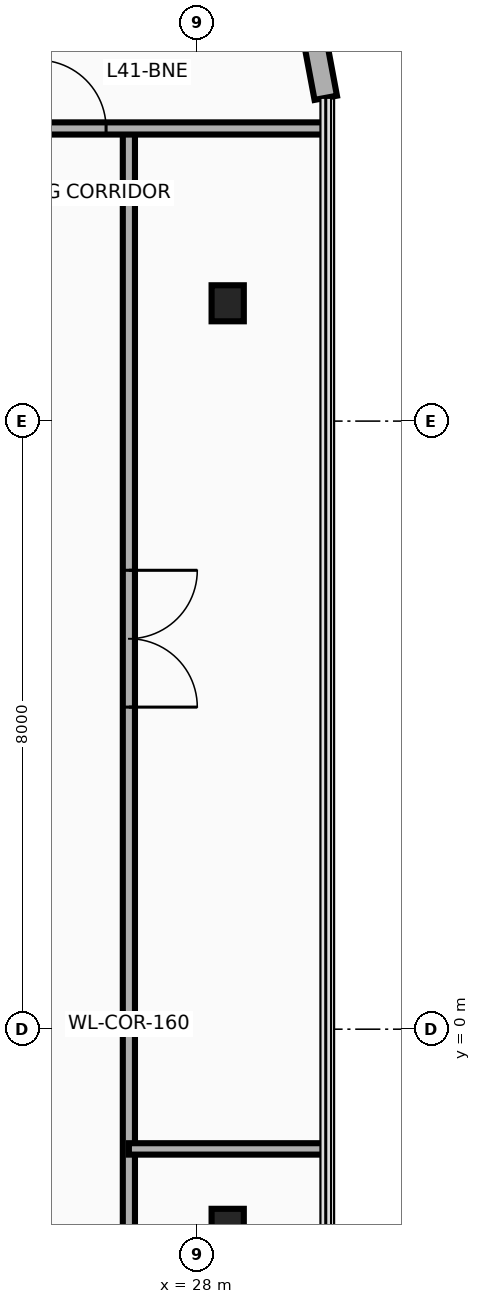
"""IFC4 building model, lengths in metres.
Left out: names, types, materials, properties, quantities, classifications, styles, units other than length and angle.
Written with IfcOpenShell. Run it as: python <this file> out.ifc"""

import sys

from ifc_helpers import new_model, si_unit, direction, frame, frame_2d, origin, origin_2d, place, context, subcontext, project, spatial, rectangle, i_section, extrude, source, transform, mapped, element, fill, save


model = new_model("IFC4")
c1 = context("Model", 3, precision=1e-05, world=origin(), true_north=direction((0.0, 1.0)))
c2 = subcontext(c1, "Body", "Model", "MODEL_VIEW")
j1 = project(units=[si_unit("LENGTHUNIT", "METRE"), si_unit("PLANEANGLEUNIT", "RADIAN")], contexts=[c1])
p1 = place(None, origin())
s1 = spatial("IfcSite", under=j1, at=p1, CompositionType="ELEMENT")
p2 = place(p1, origin())
s2 = spatial("IfcBuilding", under=s1, at=p2, CompositionType="ELEMENT")
p3 = place(p2, frame((0.0, 0.0, 161.2)))
s3 = spatial("IfcBuildingStorey", under=s2, at=p3, CompositionType="ELEMENT", Elevation=161.2)
m1 = source(origin(), c2, "Body", "SweptSolid", [
    extrude(i_section(OverallWidth=0.424, OverallDepth=0.474, WebThickness=0.048, FlangeThickness=0.077, at=origin_2d()), origin(), (0.0, 0.0, 1.0), 3.7),
])
for number, where, z_axis, x_axis in (
    (1, (28.4, -2.6, 0.0), (0.0, 0.0, 1.0), (1.0, 0.0, 0.0)),
    (2, (28.4, 9.55, 0.0), (0.0, 0.0, 1.0), (1.0, 0.0, 0.0)),
):
    element("IfcColumn", number, at=place(p3, frame(where, z_axis=z_axis, x_axis=x_axis)), inside=s3, PredefinedType="COLUMN", context=c2, shape_type="MappedRepresentation", body=[
        mapped(m1, transform((0.0, 0.0, 0.0), x_axis=(1.0, 0.0, 0.0), y_axis=(0.0, 1.0, 0.0), z_axis=(0.0, 0.0, 1.0), scale=1.0)),
    ])
p4 = place(p3, frame((29.493, 13.307, 0.0), z_axis=(0.0, 0.0, 1.0), x_axis=(0.183752343116, -0.98297257154, 0.0)))
e3 = element("IfcWall", 3, at=p4, inside=s3, PredefinedType="SOLIDWALL", context=c2, shape_type="SweptSolid", body=[
    extrude(rectangle(XDim=1.072, YDim=0.3, at=frame_2d((0.536, 0.0))), origin(), (0.0, 0.0, 1.0), 3.46),
])
p5 = place(p3, frame((27.1, -11.701, 0.0), z_axis=(0.0, 0.0, 1.0), x_axis=(0.0, 1.0, 0.0)))
e4 = element("IfcWall", 4, at=p5, inside=s3, PredefinedType="PARTITIONING", context=c2, shape_type="SweptSolid", body=[
    extrude(rectangle(XDim=23.551, YDim=0.16, at=frame_2d((11.775, 0.0))), origin(), (0.0, 0.0, 1.0), 2.666),
])
p6 = place(p5, frame((4.163, 0.0, 0.0)))
e5 = element("IfcOpeningElement", 5, at=p6, cuts=e4, PredefinedType="OPENING", context=c2, shape_type="SweptSolid", body=[
    extrude(rectangle(XDim=1.8, YDim=2.15, at=frame_2d((0.9, 1.075))), frame((0.0, 0.095, 0.0), z_axis=(0.0, -1.0, 0.0), x_axis=(1.0, 0.0, 0.0)), (0.0, 0.0, 1.0), 0.19),
])
p7 = place(p5, frame((15.938, 0.0, 0.0)))
e6 = element("IfcOpeningElement", 6, at=p7, cuts=e4, PredefinedType="OPENING", context=c2, shape_type="SweptSolid", body=[
    extrude(rectangle(XDim=1.8, YDim=2.15, at=frame_2d((0.9, 1.075))), frame((0.0, 0.095, 0.0), z_axis=(0.0, -1.0, 0.0), x_axis=(1.0, 0.0, 0.0)), (0.0, 0.0, 1.0), 0.19),
])
p8 = place(p3, frame((25.6, 11.85, 0.0), z_axis=(0.0, 0.0, 1.0), x_axis=(1.0, 0.0, 0.0)))
e7 = element("IfcWall", 7, at=p8, inside=s3, PredefinedType="PARTITIONING", context=c2, shape_type="SweptSolid", body=[
    extrude(rectangle(XDim=4.09, YDim=0.16, at=frame_2d((2.045, 0.0))), origin(), (0.0, 0.0, 1.0), 2.896),
])
p9 = place(p8, frame((0.3, 0.0, 0.0)))
e8 = element("IfcOpeningElement", 8, at=p9, cuts=e7, PredefinedType="OPENING", context=c2, shape_type="SweptSolid", body=[
    extrude(rectangle(XDim=0.9, YDim=2.1, at=frame_2d((0.45, 1.05))), frame((0.0, 0.095, 0.0), z_axis=(0.0, -1.0, 0.0), x_axis=(1.0, 0.0, 0.0)), (0.0, 0.0, 1.0), 0.19),
])
p10 = place(p3, frame((27.1, -1.575, 0.0), z_axis=(0.0, 0.0, 1.0), x_axis=(1.0, 0.0, 0.0)))
e9 = element("IfcWall", 9, at=p10, inside=s3, PredefinedType="PARTITIONING", context=c2, shape_type="SweptSolid", body=[
    extrude(rectangle(XDim=2.59, YDim=0.15, at=frame_2d((1.295, 0.0))), origin(), (0.0, 0.0, 1.0), 2.896),
])
p11 = place(p9, origin())
e10 = element("IfcDoor", 10, at=p11, inside=s3, OperationType="SINGLE_SWING_LEFT", PredefinedType="DOOR", context=c2, shape_type="SweptSolid", body=[
    extrude(rectangle(XDim=0.9, YDim=2.1, at=frame_2d((0.45, 1.05))), frame((0.0, 0.025, 0.0), z_axis=(0.0, -1.0, 0.0), x_axis=(1.0, 0.0, 0.0)), (0.0, 0.0, 1.0), 0.05),
])
fill(e8, e10)
p12 = place(p7, frame((1.8, 0.0, 0.0), z_axis=(0.0, 0.0, 1.0), x_axis=(-1.0, 0.0, 0.0)))
e11 = element("IfcDoor", 11, at=p12, inside=s3, OperationType="DOUBLE_DOOR_SINGLE_SWING", PredefinedType="DOOR", context=c2, shape_type="SweptSolid", body=[
    extrude(rectangle(XDim=1.8, YDim=2.15, at=frame_2d((0.9, 1.075))), frame((0.0, 0.025, 0.0), z_axis=(0.0, -1.0, 0.0), x_axis=(1.0, 0.0, 0.0)), (0.0, 0.0, 1.0), 0.05),
])
fill(e6, e11)
save(model, sys.argv[1])
